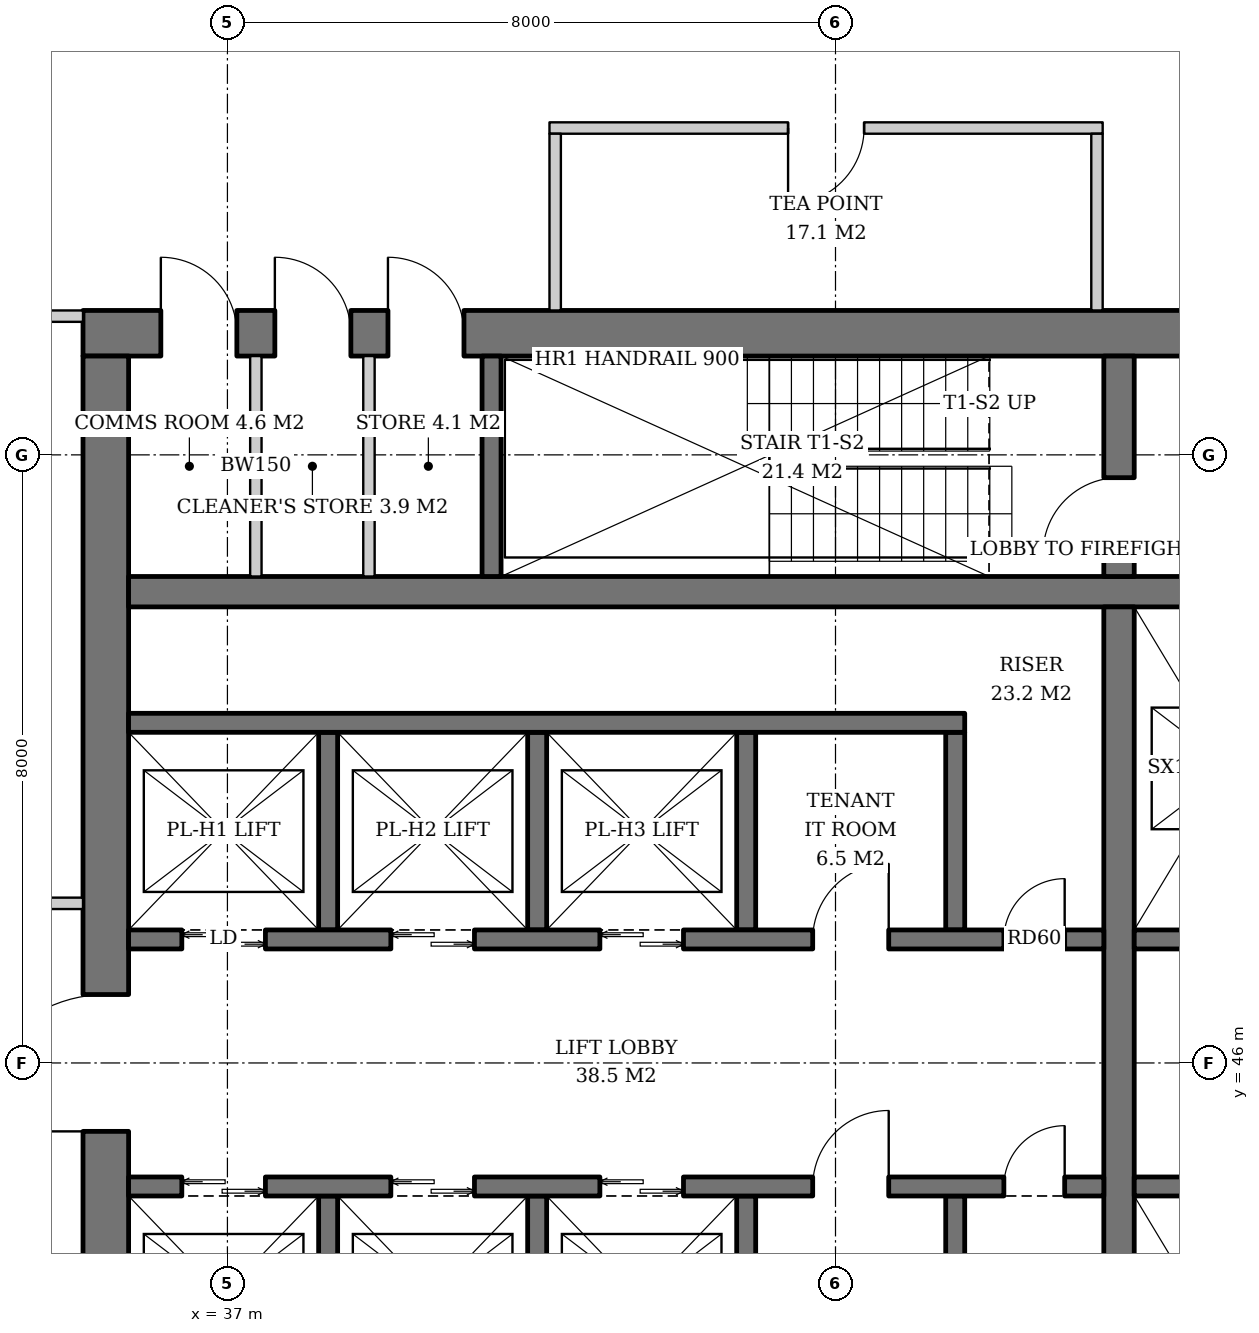
"""IFC4 building model, lengths in metres.
Left out: names, types, materials, properties, quantities, classifications, styles, units other than length and angle.
Written with IfcOpenShell. Run it as: python <this file> out.ifc"""

import sys

from ifc_helpers import new_model, si_unit, direction, frame, frame_2d, origin, place, context, subcontext, project, spatial, rectangle, extrude, element, fill, save


model = new_model("IFC4")
c1 = context("Model", 3, precision=1e-05, world=origin(), true_north=direction((0.0, 1.0)))
c2 = subcontext(c1, "Body", "Model", "MODEL_VIEW")
j1 = project(units=[si_unit("LENGTHUNIT", "METRE"), si_unit("PLANEANGLEUNIT", "RADIAN")], contexts=[c1])
p1 = place(None, origin())
s1 = spatial("IfcSite", under=j1, at=p1, CompositionType="ELEMENT")
p2 = place(p1, origin())
s2 = spatial("IfcBuilding", under=s1, at=p2, CompositionType="ELEMENT")
p3 = place(p2, frame((0.0, 0.0, 188.2)))
s3 = spatial("IfcBuildingStorey", under=s2, at=p3, CompositionType="ELEMENT", Elevation=188.2)
p4 = place(p3, frame((35.1, 55.6, 0.0), z_axis=(0.0, 0.0, 1.0), x_axis=(1.0, 0.0, 0.0)))
e1 = element("IfcWall", 1, at=p4, inside=s3, PredefinedType="SHEAR", context=c2, shape_type="SweptSolid", body=[
    extrude(rectangle(XDim=19.8, YDim=0.6, at=frame_2d((9.9, 0.0))), origin(), (0.0, 0.0, 1.0), 3.8),
])
p5 = place(p4, frame((14.54, 0.0, 0.0)))
e2 = element("IfcOpeningElement", 2, at=p5, cuts=e1, PredefinedType="OPENING", context=c2, shape_type="SweptSolid", body=[
    extrude(rectangle(XDim=1.0, YDim=2.1, at=frame_2d((0.5, 1.05))), frame((0.0, 0.31, 0.0), z_axis=(0.0, -1.0, 0.0), x_axis=(1.0, 0.0, 0.0)), (0.0, 0.0, 1.0), 0.62),
])
p6 = place(p4, frame((1.024, 0.0, 0.0)))
e3 = element("IfcOpeningElement", 3, at=p6, cuts=e1, PredefinedType="OPENING", context=c2, shape_type="SweptSolid", body=[
    extrude(rectangle(XDim=1.0, YDim=2.1, at=frame_2d((0.5, 1.05))), frame((0.0, 0.31, 0.0), z_axis=(0.0, -1.0, 0.0), x_axis=(1.0, 0.0, 0.0)), (0.0, 0.0, 1.0), 0.62),
])
p7 = place(p4, frame((2.524, 0.0, 0.0)))
e4 = element("IfcOpeningElement", 4, at=p7, cuts=e1, PredefinedType="OPENING", context=c2, shape_type="SweptSolid", body=[
    extrude(rectangle(XDim=1.0, YDim=2.1, at=frame_2d((0.5, 1.05))), frame((0.0, 0.31, 0.0), z_axis=(0.0, -1.0, 0.0), x_axis=(1.0, 0.0, 0.0)), (0.0, 0.0, 1.0), 0.62),
])
p8 = place(p4, frame((4.012, 0.0, 0.0)))
e5 = element("IfcOpeningElement", 5, at=p8, cuts=e1, PredefinedType="OPENING", context=c2, shape_type="SweptSolid", body=[
    extrude(rectangle(XDim=1.0, YDim=2.1, at=frame_2d((0.5, 1.05))), frame((0.0, 0.31, 0.0), z_axis=(0.0, -1.0, 0.0), x_axis=(1.0, 0.0, 0.0)), (0.0, 0.0, 1.0), 0.62),
])
p9 = place(p3, frame((35.4, 36.7, 0.0), z_axis=(0.0, 0.0, 1.0), x_axis=(0.0, 1.0, 0.0)))
e6 = element("IfcWall", 6, at=p9, inside=s3, PredefinedType="SHEAR", context=c2, shape_type="SweptSolid", body=[
    extrude(rectangle(XDim=18.6, YDim=0.6, at=frame_2d((9.3, 0.0))), origin(), (0.0, 0.0, 1.0), 3.8),
])
p10 = place(p9, frame((8.4, 0.0, 0.0)))
e7 = element("IfcOpeningElement", 7, at=p10, cuts=e6, PredefinedType="OPENING", context=c2, shape_type="SweptSolid", body=[
    extrude(rectangle(XDim=1.8, YDim=2.4, at=frame_2d((0.9, 1.2))), frame((0.0, 0.31, 0.0), z_axis=(0.0, -1.0, 0.0), x_axis=(1.0, 0.0, 0.0)), (0.0, 0.0, 1.0), 0.62),
])
p11 = place(p3, frame((35.7, 52.2, 0.0), z_axis=(0.0, 0.0, 1.0), x_axis=(1.0, 0.0, 0.0)))
e8 = element("IfcWall", 8, at=p11, inside=s3, PredefinedType="SHEAR", context=c2, shape_type="SweptSolid", body=[
    extrude(rectangle(XDim=18.6, YDim=0.4, at=frame_2d((9.3, 0.0))), origin(), (0.0, 0.0, 1.0), 3.8),
])
p12 = place(p3, frame((48.73, 40.0, 0.0), z_axis=(0.0, 0.0, 1.0), x_axis=(0.0, 1.0, 0.0)))
e9 = element("IfcWall", 9, at=p12, inside=s3, PredefinedType="SHEAR", context=c2, shape_type="SweptSolid", body=[
    extrude(rectangle(XDim=12.0, YDim=0.4, at=frame_2d((6.0, 0.0))), origin(), (0.0, 0.0, 1.0), 3.8),
])
p13 = place(p3, frame((48.73, 52.4, 0.0), z_axis=(0.0, 0.0, 1.0), x_axis=(0.0, 1.0, 0.0)))
e10 = element("IfcWall", 10, at=p13, inside=s3, PredefinedType="SHEAR", context=c2, shape_type="SweptSolid", body=[
    extrude(rectangle(XDim=2.9, YDim=0.4, at=frame_2d((1.45, 0.0))), origin(), (0.0, 0.0, 1.0), 3.8),
])
p14 = place(p13, frame((0.3, 0.0, 0.0)))
e11 = element("IfcOpeningElement", 11, at=p14, cuts=e10, PredefinedType="OPENING", context=c2, shape_type="SweptSolid", body=[
    extrude(rectangle(XDim=1.0, YDim=2.1, at=frame_2d((0.5, 1.05))), frame((0.0, 0.21, 0.0), z_axis=(0.0, -1.0, 0.0), x_axis=(1.0, 0.0, 0.0)), (0.0, 0.0, 1.0), 0.42),
])
p15 = place(p3, frame((40.475, 52.4, 0.0), z_axis=(0.0, 0.0, 1.0), x_axis=(0.0, 1.0, 0.0)))
e12 = element("IfcWall", 12, at=p15, inside=s3, PredefinedType="SHEAR", context=c2, shape_type="SweptSolid", body=[
    extrude(rectangle(XDim=2.9, YDim=0.25, at=frame_2d((1.45, 0.0))), origin(), (0.0, 0.0, 1.0), 3.8),
])
for number, where, z_axis, x_axis in (
    (13, (38.325, 47.75, 0.0), (0.0, 0.0, 1.0), (0.0, 1.0, 0.0)),
    (14, (41.075, 47.75, 0.0), (0.0, 0.0, 1.0), (0.0, 1.0, 0.0)),
    (15, (43.825, 47.75, 0.0), (0.0, 0.0, 1.0), (0.0, 1.0, 0.0)),
    (16, (46.575, 47.75, 0.0), (0.0, 0.0, 1.0), (0.0, 1.0, 0.0)),
):
    element("IfcWall", number, at=place(p3, frame(where, z_axis=z_axis, x_axis=x_axis)), inside=s3, PredefinedType="SHEAR", context=c2, shape_type="SweptSolid", body=[
        extrude(rectangle(XDim=2.6, YDim=0.25, at=frame_2d((1.3, 0.0))), origin(), (0.0, 0.0, 1.0), 3.8),
    ])
p16 = place(p3, frame((35.7, 50.475, 0.0), z_axis=(0.0, 0.0, 1.0), x_axis=(1.0, 0.0, 0.0)))
e17 = element("IfcWall", 17, at=p16, inside=s3, PredefinedType="SHEAR", context=c2, shape_type="SweptSolid", body=[
    extrude(rectangle(XDim=11.0, YDim=0.25, at=frame_2d((5.5, 0.0))), origin(), (0.0, 0.0, 1.0), 3.8),
])
p17 = place(p3, frame((35.7, 47.625, 0.0), z_axis=(0.0, 0.0, 1.0), x_axis=(1.0, 0.0, 0.0)))
e18 = element("IfcWall", 18, at=p17, inside=s3, PredefinedType="SHEAR", context=c2, shape_type="SweptSolid", body=[
    extrude(rectangle(XDim=12.83, YDim=0.25, at=frame_2d((6.415, 0.0))), origin(), (0.0, 0.0, 1.0), 3.8),
])
p18 = place(p17, frame((0.7, 0.0, 0.0)))
e19 = element("IfcOpeningElement", 19, at=p18, cuts=e18, PredefinedType="OPENING", context=c2, shape_type="SweptSolid", body=[
    extrude(rectangle(XDim=1.1, YDim=2.2, at=frame_2d((0.55, 1.1))), frame((0.0, 0.135, 0.0), z_axis=(0.0, -1.0, 0.0), x_axis=(1.0, 0.0, 0.0)), (0.0, 0.0, 1.0), 0.27),
])
p19 = place(p17, frame((3.45, 0.0, 0.0)))
e20 = element("IfcOpeningElement", 20, at=p19, cuts=e18, PredefinedType="OPENING", context=c2, shape_type="SweptSolid", body=[
    extrude(rectangle(XDim=1.1, YDim=2.2, at=frame_2d((0.55, 1.1))), frame((0.0, 0.135, 0.0), z_axis=(0.0, -1.0, 0.0), x_axis=(1.0, 0.0, 0.0)), (0.0, 0.0, 1.0), 0.27),
])
p20 = place(p17, frame((6.2, 0.0, 0.0)))
e21 = element("IfcOpeningElement", 21, at=p20, cuts=e18, PredefinedType="OPENING", context=c2, shape_type="SweptSolid", body=[
    extrude(rectangle(XDim=1.1, YDim=2.2, at=frame_2d((0.55, 1.1))), frame((0.0, 0.135, 0.0), z_axis=(0.0, -1.0, 0.0), x_axis=(1.0, 0.0, 0.0)), (0.0, 0.0, 1.0), 0.27),
])
p21 = place(p17, frame((9.0, 0.0, 0.0)))
e22 = element("IfcOpeningElement", 22, at=p21, cuts=e18, PredefinedType="OPENING", context=c2, shape_type="SweptSolid", body=[
    extrude(rectangle(XDim=1.0, YDim=2.1, at=frame_2d((0.5, 1.05))), frame((0.0, 0.135, 0.0), z_axis=(0.0, -1.0, 0.0), x_axis=(1.0, 0.0, 0.0)), (0.0, 0.0, 1.0), 0.27),
])
p22 = place(p17, frame((11.515, 0.0, 0.0)))
e23 = element("IfcOpeningElement", 23, at=p22, cuts=e18, PredefinedType="OPENING", context=c2, shape_type="SweptSolid", body=[
    extrude(rectangle(XDim=0.8, YDim=2.0, at=frame_2d((0.4, 1.0))), frame((0.0, 0.135, 0.0), z_axis=(0.0, -1.0, 0.0), x_axis=(1.0, 0.0, 0.0)), (0.0, 0.0, 1.0), 0.27),
])
for number, where, z_axis, x_axis in (
    (24, (38.325, 44.25, 0.0), (0.0, 0.0, 1.0), (0.0, -1.0, 0.0)),
    (25, (41.075, 44.25, 0.0), (0.0, 0.0, 1.0), (0.0, -1.0, 0.0)),
    (26, (43.825, 44.25, 0.0), (0.0, 0.0, 1.0), (0.0, -1.0, 0.0)),
    (27, (46.575, 44.25, 0.0), (0.0, 0.0, 1.0), (0.0, -1.0, 0.0)),
):
    element("IfcWall", number, at=place(p3, frame(where, z_axis=z_axis, x_axis=x_axis)), inside=s3, PredefinedType="SHEAR", context=c2, shape_type="SweptSolid", body=[
        extrude(rectangle(XDim=2.6, YDim=0.25, at=frame_2d((1.3, 0.0))), origin(), (0.0, 0.0, 1.0), 3.8),
    ])
p23 = place(p3, frame((35.7, 44.375, 0.0), z_axis=(0.0, 0.0, 1.0), x_axis=(1.0, 0.0, 0.0)))
e28 = element("IfcWall", 28, at=p23, inside=s3, PredefinedType="SHEAR", context=c2, shape_type="SweptSolid", body=[
    extrude(rectangle(XDim=12.83, YDim=0.25, at=frame_2d((6.415, 0.0))), origin(), (0.0, 0.0, 1.0), 3.8),
])
p24 = place(p23, frame((0.7, 0.0, 0.0)))
e29 = element("IfcOpeningElement", 29, at=p24, cuts=e28, PredefinedType="OPENING", context=c2, shape_type="SweptSolid", body=[
    extrude(rectangle(XDim=1.1, YDim=2.2, at=frame_2d((0.55, 1.1))), frame((0.0, 0.135, 0.0), z_axis=(0.0, -1.0, 0.0), x_axis=(1.0, 0.0, 0.0)), (0.0, 0.0, 1.0), 0.27),
])
p25 = place(p23, frame((3.45, 0.0, 0.0)))
e30 = element("IfcOpeningElement", 30, at=p25, cuts=e28, PredefinedType="OPENING", context=c2, shape_type="SweptSolid", body=[
    extrude(rectangle(XDim=1.1, YDim=2.2, at=frame_2d((0.55, 1.1))), frame((0.0, 0.135, 0.0), z_axis=(0.0, -1.0, 0.0), x_axis=(1.0, 0.0, 0.0)), (0.0, 0.0, 1.0), 0.27),
])
p26 = place(p23, frame((6.2, 0.0, 0.0)))
e31 = element("IfcOpeningElement", 31, at=p26, cuts=e28, PredefinedType="OPENING", context=c2, shape_type="SweptSolid", body=[
    extrude(rectangle(XDim=1.1, YDim=2.2, at=frame_2d((0.55, 1.1))), frame((0.0, 0.135, 0.0), z_axis=(0.0, -1.0, 0.0), x_axis=(1.0, 0.0, 0.0)), (0.0, 0.0, 1.0), 0.27),
])
p27 = place(p23, frame((9.0, 0.0, 0.0)))
e32 = element("IfcOpeningElement", 32, at=p27, cuts=e28, PredefinedType="OPENING", context=c2, shape_type="SweptSolid", body=[
    extrude(rectangle(XDim=1.0, YDim=2.1, at=frame_2d((0.5, 1.05))), frame((0.0, 0.135, 0.0), z_axis=(0.0, -1.0, 0.0), x_axis=(1.0, 0.0, 0.0)), (0.0, 0.0, 1.0), 0.27),
])
p28 = place(p23, frame((11.515, 0.0, 0.0)))
e33 = element("IfcOpeningElement", 33, at=p28, cuts=e28, PredefinedType="OPENING", context=c2, shape_type="SweptSolid", body=[
    extrude(rectangle(XDim=0.8, YDim=2.0, at=frame_2d((0.4, 1.0))), frame((0.0, 0.135, 0.0), z_axis=(0.0, -1.0, 0.0), x_axis=(1.0, 0.0, 0.0)), (0.0, 0.0, 1.0), 0.27),
])
for number, where, z_axis, x_axis in (
    (34, (48.93, 47.625, 0.0), (0.0, 0.0, 1.0), (1.0, 0.0, 0.0)),
    (35, (48.93, 44.375, 0.0), (0.0, 0.0, 1.0), (1.0, 0.0, 0.0)),
):
    element("IfcWall", number, at=place(p3, frame(where, z_axis=z_axis, x_axis=x_axis)), inside=s3, PredefinedType="SHEAR", context=c2, shape_type="SweptSolid", body=[
        extrude(rectangle(XDim=5.37, YDim=0.25, at=frame_2d((2.685, 0.0))), origin(), (0.0, 0.0, 1.0), 3.8),
    ])
for number, where, z_axis, x_axis in (
    (36, (37.374, 52.4, 0.0), (0.0, 0.0, 1.0), (0.0, 1.0, 0.0)),
    (37, (38.862, 52.4, 0.0), (0.0, 0.0, 1.0), (0.0, 1.0, 0.0)),
):
    element("IfcWall", number, at=place(p3, frame(where, z_axis=z_axis, x_axis=x_axis)), inside=s3, PredefinedType="SOLIDWALL", context=c2, shape_type="SweptSolid", body=[
        extrude(rectangle(XDim=2.9, YDim=0.15, at=frame_2d((1.45, 0.0))), origin(), (0.0, 0.0, 1.0), 3.62),
    ])
p29 = place(p3, frame((48.515, 58.3, 0.0), z_axis=(0.0, 0.0, 1.0), x_axis=(-1.0, 0.0, 0.0)))
e38 = element("IfcWall", 38, at=p29, inside=s3, PredefinedType="PARTITIONING", context=c2, shape_type="SweptSolid", body=[
    extrude(rectangle(XDim=7.278, YDim=0.15, at=frame_2d((3.639, 0.0))), origin(), (0.0, 0.0, 1.0), 2.867),
])
p30 = place(p29, frame((3.139, 0.0, 0.0)))
e39 = element("IfcOpeningElement", 39, at=p30, cuts=e38, PredefinedType="OPENING", context=c2, shape_type="SweptSolid", body=[
    extrude(rectangle(XDim=1.0, YDim=2.1, at=frame_2d((0.5, 1.05))), frame((0.0, 0.085, 0.0), z_axis=(0.0, -1.0, 0.0), x_axis=(1.0, 0.0, 0.0)), (0.0, 0.0, 1.0), 0.17),
])
for number, where, z_axis, x_axis in (
    (40, (48.44, 55.9, 0.0), (0.0, 0.0, 1.0), (0.0, 1.0, 0.0)),
    (41, (41.312, 55.9, 0.0), (0.0, 0.0, 1.0), (0.0, 1.0, 0.0)),
):
    element("IfcWall", number, at=place(p3, frame(where, z_axis=z_axis, x_axis=x_axis)), inside=s3, PredefinedType="PARTITIONING", context=c2, shape_type="SweptSolid", body=[
        extrude(rectangle(XDim=2.325, YDim=0.15, at=frame_2d((1.163, 0.0))), origin(), (0.0, 0.0, 1.0), 3.62),
    ])
p31 = place(p3, frame((35.1, 55.825, 0.0), z_axis=(0.0, 0.0, 1.0), x_axis=(-1.0, 0.0, 0.0)))
e42 = element("IfcWall", 42, at=p31, inside=s3, PredefinedType="PARTITIONING", context=c2, shape_type="SweptSolid", body=[
    extrude(rectangle(XDim=2.325, YDim=0.15, at=frame_2d((1.163, 0.0))), origin(), (0.0, 0.0, 1.0), 2.867),
])
p32 = place(p3, frame((35.1, 48.1, 0.0), z_axis=(0.0, 0.0, 1.0), x_axis=(-1.0, 0.0, 0.0)))
e43 = element("IfcWall", 43, at=p32, inside=s3, PredefinedType="PARTITIONING", context=c2, shape_type="SweptSolid", body=[
    extrude(rectangle(XDim=2.325, YDim=0.15, at=frame_2d((1.163, 0.0))), origin(), (0.0, 0.0, 1.0), 3.62),
])
p33 = place(p18, origin())
e44 = element("IfcDoor", 44, at=p33, inside=s3, OperationType="DOUBLE_DOOR_SLIDING", PredefinedType="DOOR", context=c2, shape_type="SweptSolid", body=[
    extrude(rectangle(XDim=1.1, YDim=2.2, at=frame_2d((0.55, 1.1))), frame((0.0, 0.025, 0.0), z_axis=(0.0, -1.0, 0.0), x_axis=(1.0, 0.0, 0.0)), (0.0, 0.0, 1.0), 0.05),
])
fill(e19, e44)
p34 = place(p19, origin())
e45 = element("IfcDoor", 45, at=p34, inside=s3, OperationType="DOUBLE_DOOR_SLIDING", PredefinedType="DOOR", context=c2, shape_type="SweptSolid", body=[
    extrude(rectangle(XDim=1.1, YDim=2.2, at=frame_2d((0.55, 1.1))), frame((0.0, 0.025, 0.0), z_axis=(0.0, -1.0, 0.0), x_axis=(1.0, 0.0, 0.0)), (0.0, 0.0, 1.0), 0.05),
])
fill(e20, e45)
p35 = place(p20, origin())
e46 = element("IfcDoor", 46, at=p35, inside=s3, OperationType="DOUBLE_DOOR_SLIDING", PredefinedType="DOOR", context=c2, shape_type="SweptSolid", body=[
    extrude(rectangle(XDim=1.1, YDim=2.2, at=frame_2d((0.55, 1.1))), frame((0.0, 0.025, 0.0), z_axis=(0.0, -1.0, 0.0), x_axis=(1.0, 0.0, 0.0)), (0.0, 0.0, 1.0), 0.05),
])
fill(e21, e46)
p36 = place(p21, origin())
e47 = element("IfcDoor", 47, at=p36, inside=s3, OperationType="SINGLE_SWING_RIGHT", PredefinedType="DOOR", context=c2, shape_type="SweptSolid", body=[
    extrude(rectangle(XDim=1.0, YDim=2.1, at=frame_2d((0.5, 1.05))), frame((0.0, 0.025, 0.0), z_axis=(0.0, -1.0, 0.0), x_axis=(1.0, 0.0, 0.0)), (0.0, 0.0, 1.0), 0.05),
])
fill(e22, e47)
p37 = place(p22, origin())
e48 = element("IfcDoor", 48, at=p37, inside=s3, OperationType="SINGLE_SWING_RIGHT", PredefinedType="DOOR", context=c2, shape_type="SweptSolid", body=[
    extrude(rectangle(XDim=0.8, YDim=2.0, at=frame_2d((0.4, 1.0))), frame((0.0, 0.025, 0.0), z_axis=(0.0, -1.0, 0.0), x_axis=(1.0, 0.0, 0.0)), (0.0, 0.0, 1.0), 0.05),
])
fill(e23, e48)
p38 = place(p24, origin())
e49 = element("IfcDoor", 49, at=p38, inside=s3, OperationType="DOUBLE_DOOR_SLIDING", PredefinedType="DOOR", context=c2, shape_type="SweptSolid", body=[
    extrude(rectangle(XDim=1.1, YDim=2.2, at=frame_2d((0.55, 1.1))), frame((0.0, 0.025, 0.0), z_axis=(0.0, -1.0, 0.0), x_axis=(1.0, 0.0, 0.0)), (0.0, 0.0, 1.0), 0.05),
])
fill(e29, e49)
p39 = place(p25, origin())
e50 = element("IfcDoor", 50, at=p39, inside=s3, OperationType="DOUBLE_DOOR_SLIDING", PredefinedType="DOOR", context=c2, shape_type="SweptSolid", body=[
    extrude(rectangle(XDim=1.1, YDim=2.2, at=frame_2d((0.55, 1.1))), frame((0.0, 0.025, 0.0), z_axis=(0.0, -1.0, 0.0), x_axis=(1.0, 0.0, 0.0)), (0.0, 0.0, 1.0), 0.05),
])
fill(e30, e50)
p40 = place(p26, origin())
e51 = element("IfcDoor", 51, at=p40, inside=s3, OperationType="DOUBLE_DOOR_SLIDING", PredefinedType="DOOR", context=c2, shape_type="SweptSolid", body=[
    extrude(rectangle(XDim=1.1, YDim=2.2, at=frame_2d((0.55, 1.1))), frame((0.0, 0.025, 0.0), z_axis=(0.0, -1.0, 0.0), x_axis=(1.0, 0.0, 0.0)), (0.0, 0.0, 1.0), 0.05),
])
fill(e31, e51)
p41 = place(p27, origin())
e52 = element("IfcDoor", 52, at=p41, inside=s3, OperationType="SINGLE_SWING_RIGHT", PredefinedType="DOOR", context=c2, shape_type="SweptSolid", body=[
    extrude(rectangle(XDim=1.0, YDim=2.1, at=frame_2d((0.5, 1.05))), frame((0.0, 0.025, 0.0), z_axis=(0.0, -1.0, 0.0), x_axis=(1.0, 0.0, 0.0)), (0.0, 0.0, 1.0), 0.05),
])
fill(e32, e52)
p42 = place(p28, origin())
e53 = element("IfcDoor", 53, at=p42, inside=s3, OperationType="SINGLE_SWING_RIGHT", PredefinedType="DOOR", context=c2, shape_type="SweptSolid", body=[
    extrude(rectangle(XDim=0.8, YDim=2.0, at=frame_2d((0.4, 1.0))), frame((0.0, 0.025, 0.0), z_axis=(0.0, -1.0, 0.0), x_axis=(1.0, 0.0, 0.0)), (0.0, 0.0, 1.0), 0.05),
])
fill(e33, e53)
p43 = place(p14, origin())
e54 = element("IfcDoor", 54, at=p43, inside=s3, OperationType="SINGLE_SWING_LEFT", PredefinedType="DOOR", context=c2, shape_type="SweptSolid", body=[
    extrude(rectangle(XDim=1.0, YDim=2.1, at=frame_2d((0.5, 1.05))), frame((0.0, 0.025, 0.0), z_axis=(0.0, -1.0, 0.0), x_axis=(1.0, 0.0, 0.0)), (0.0, 0.0, 1.0), 0.05),
])
fill(e11, e54)
p44 = place(p10, origin())
e55 = element("IfcDoor", 55, at=p44, inside=s3, OperationType="DOUBLE_DOOR_SINGLE_SWING", PredefinedType="DOOR", context=c2, shape_type="SweptSolid", body=[
    extrude(rectangle(XDim=1.8, YDim=2.4, at=frame_2d((0.9, 1.2))), frame((0.0, 0.025, 0.0), z_axis=(0.0, -1.0, 0.0), x_axis=(1.0, 0.0, 0.0)), (0.0, 0.0, 1.0), 0.05),
])
fill(e7, e55)
p45 = place(p6, origin())
e56 = element("IfcDoor", 56, at=p45, inside=s3, OperationType="SINGLE_SWING_LEFT", PredefinedType="DOOR", context=c2, shape_type="SweptSolid", body=[
    extrude(rectangle(XDim=1.0, YDim=2.1, at=frame_2d((0.5, 1.05))), frame((0.0, -0.24, 0.0), z_axis=(0.0, -1.0, 0.0), x_axis=(1.0, 0.0, 0.0)), (0.0, 0.0, 1.0), 0.05),
])
fill(e3, e56)
p46 = place(p7, origin())
e57 = element("IfcDoor", 57, at=p46, inside=s3, OperationType="SINGLE_SWING_LEFT", PredefinedType="DOOR", context=c2, shape_type="SweptSolid", body=[
    extrude(rectangle(XDim=1.0, YDim=2.1, at=frame_2d((0.5, 1.05))), frame((0.0, -0.24, 0.0), z_axis=(0.0, -1.0, 0.0), x_axis=(1.0, 0.0, 0.0)), (0.0, 0.0, 1.0), 0.05),
])
fill(e4, e57)
p47 = place(p8, origin())
e58 = element("IfcDoor", 58, at=p47, inside=s3, OperationType="SINGLE_SWING_LEFT", PredefinedType="DOOR", context=c2, shape_type="SweptSolid", body=[
    extrude(rectangle(XDim=1.0, YDim=2.1, at=frame_2d((0.5, 1.05))), frame((0.0, -0.24, 0.0), z_axis=(0.0, -1.0, 0.0), x_axis=(1.0, 0.0, 0.0)), (0.0, 0.0, 1.0), 0.05),
])
fill(e5, e58)
p48 = place(p30, origin())
e59 = element("IfcDoor", 59, at=p48, inside=s3, OperationType="SINGLE_SWING_RIGHT", PredefinedType="DOOR", context=c2, shape_type="SweptSolid", body=[
    extrude(rectangle(XDim=1.0, YDim=2.1, at=frame_2d((0.5, 1.05))), frame((0.0, 0.025, 0.0), z_axis=(0.0, -1.0, 0.0), x_axis=(1.0, 0.0, 0.0)), (0.0, 0.0, 1.0), 0.05),
])
fill(e39, e59)
save(model, sys.argv[1])
